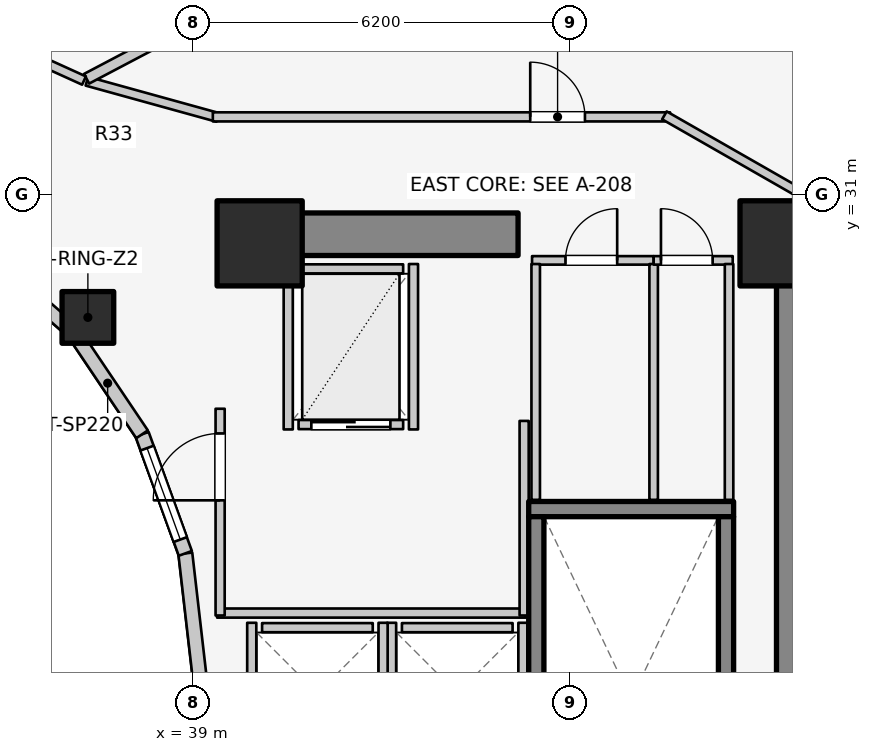
"""IFC4 building model, lengths in metres.
Left out: names, types, materials, properties, quantities, classifications, styles, units other than length and angle.
Written with IfcOpenShell. Run it as: python <this file> out.ifc"""

import sys

from ifc_helpers import new_model, si_unit, direction, frame, frame_2d, origin, origin_2d, place, context, subcontext, project, spatial, rectangle, extrude, element, fill, save


model = new_model("IFC4")
c1 = context("Model", 3, precision=1e-05, world=origin(), true_north=direction((0.0, 1.0)))
c2 = subcontext(c1, "Body", "Model", "MODEL_VIEW")
j1 = project(units=[si_unit("LENGTHUNIT", "METRE"), si_unit("PLANEANGLEUNIT", "RADIAN")], contexts=[c1])
p1 = place(None, origin())
s1 = spatial("IfcSite", under=j1, at=p1, CompositionType="ELEMENT")
p2 = place(p1, origin())
s2 = spatial("IfcBuilding", under=s1, at=p2, CompositionType="ELEMENT")
p3 = place(p2, frame((0.0, 0.0, 98.0)))
s3 = spatial("IfcBuildingStorey", under=s2, at=p3, CompositionType="ELEMENT", Elevation=98.0)
p4 = place(p3, frame((48.95, 17.05, 0.0), z_axis=(0.0, 0.0, 1.0), x_axis=(0.0, 1.0, 0.0)))
e1 = element("IfcWall", 1, at=p4, inside=s3, PredefinedType="SHEAR", context=c2, shape_type="SweptSolid", body=[
    extrude(rectangle(XDim=12.8, YDim=0.7, at=frame_2d((6.4, 0.0))), origin(), (0.0, 0.0, 1.0), 3.1),
])
p5 = place(p3, frame((39.85, 30.35, 0.0), z_axis=(0.0, 0.0, 1.0), x_axis=(1.0, 0.0, 0.0)))
e2 = element("IfcWall", 2, at=p5, inside=s3, PredefinedType="SHEAR", context=c2, shape_type="SweptSolid", body=[
    extrude(rectangle(XDim=4.5, YDim=0.7, at=frame_2d((2.25, 0.0))), origin(), (0.0, 0.0, 1.0), 3.1),
])
p6 = place(p3, frame((44.525, 25.83, 0.0), z_axis=(0.0, 0.0, 1.0), x_axis=(1.0, 0.0, 0.0)))
e3 = element("IfcWall", 3, at=p6, inside=s3, PredefinedType="SOLIDWALL", context=c2, shape_type="SweptSolid", body=[
    extrude(rectangle(XDim=3.37, YDim=0.25, at=frame_2d((1.685, 0.0))), origin(), (0.0, 0.0, 1.0), 3.1),
])
for number, where, z_axis, x_axis in (
    (4, (44.65, 17.895, 0.0), (0.0, 0.0, 1.0), (0.0, 1.0, 0.0)),
    (5, (47.77, 17.895, 0.0), (0.0, 0.0, 1.0), (0.0, 1.0, 0.0)),
):
    element("IfcWall", number, at=place(p3, frame(where, z_axis=z_axis, x_axis=x_axis)), inside=s3, PredefinedType="SOLIDWALL", context=c2, shape_type="SweptSolid", body=[
        extrude(rectangle(XDim=7.81, YDim=0.25, at=frame_2d((3.905, 0.0))), origin(), (0.0, 0.0, 1.0), 3.1),
    ])
for number, where, z_axis, x_axis in (
    (6, (48.7, 30.2, 0.0), (0.0, 0.0, 1.0), (1.0, 0.0, 0.0)),
    (7, (40.1, 30.2, 0.0), (0.0, 0.0, 1.0), (1.0, 0.0, 0.0)),
):
    element("IfcColumn", number, at=place(p3, frame(where, z_axis=z_axis, x_axis=x_axis)), inside=s3, PredefinedType="COLUMN", context=c2, shape_type="SweptSolid", body=[
        extrude(rectangle(XDim=1.4, YDim=1.4, at=origin_2d()), origin(), (0.0, 0.0, 1.0), 3.1),
    ])
p7 = place(p3, frame((37.275, 28.982, 0.0), z_axis=(0.0, 0.0, 1.0), x_axis=(1.0, 0.0, 0.0)))
e8 = element("IfcColumn", 8, at=p7, inside=s3, PredefinedType="COLUMN", context=c2, shape_type="SweptSolid", body=[
    extrude(rectangle(XDim=0.85, YDim=0.85, at=origin_2d()), origin(), (0.0, 0.0, 1.0), 3.1),
])
p8 = place(p3, frame((39.12, 23.0, 0.0), z_axis=(0.0, 0.0, 1.0), x_axis=(-0.114711713601, 0.993398823617, 0.0)))
e9 = element("IfcWall", 9, at=p8, inside=s3, PredefinedType="STANDARD", context=c2, shape_type="SweptSolid", body=[
    extrude(rectangle(XDim=2.115, YDim=0.23, at=frame_2d((1.058, 0.0))), origin(), (0.0, 0.0, 1.0), 2.84),
])
p9 = place(p3, frame((38.877, 25.102, 0.0), z_axis=(0.0, 0.0, 1.0), x_axis=(-0.341423187295, 0.93990968033, 0.0)))
e10 = element("IfcWall", 10, at=p9, inside=s3, PredefinedType="STANDARD", context=c2, shape_type="SweptSolid", body=[
    extrude(rectangle(XDim=2.084, YDim=0.23, at=frame_2d((1.042, 0.0))), origin(), (0.0, 0.0, 1.0), 2.84),
])
p10 = place(p9, frame((0.242, 0.0, 0.85)))
e11 = element("IfcOpeningElement", 11, at=p10, cuts=e10, PredefinedType="OPENING", context=c2, shape_type="SweptSolid", body=[
    extrude(rectangle(XDim=1.6, YDim=1.65, at=frame_2d((0.8, 0.825))), frame((0.0, 0.125, 0.0), z_axis=(0.0, -1.0, 0.0), x_axis=(1.0, 0.0, 0.0)), (0.0, 0.0, 1.0), 0.25),
])
p11 = place(p3, frame((38.166, 27.06, 0.0), z_axis=(0.0, 0.0, 1.0), x_axis=(-0.558197800898, 0.829707909492, 0.0)))
e12 = element("IfcWall", 12, at=p11, inside=s3, PredefinedType="STANDARD", context=c2, shape_type="SweptSolid", body=[
    extrude(rectangle(XDim=2.027, YDim=0.23, at=frame_2d((1.013, 0.0))), origin(), (0.0, 0.0, 1.0), 2.16),
])
p12 = place(p3, frame((37.035, 28.742, 0.0), z_axis=(0.0, 0.0, 1.0), x_axis=(-0.752576694707, 0.658504607869, 0.0)))
e13 = element("IfcWall", 13, at=p12, inside=s3, PredefinedType="STANDARD", context=c2, shape_type="SweptSolid", body=[
    extrude(rectangle(XDim=1.959, YDim=0.23, at=frame_2d((0.98, 0.0))), origin(), (0.0, 0.0, 1.0), 2.16),
])
p13 = place(p3, frame((42.44, 23.88, 0.0), z_axis=(0.0, 0.0, 1.0), x_axis=(1.0, 0.0, 0.0)))
e14 = element("IfcWall", 14, at=p13, inside=s3, PredefinedType="SOLIDWALL", context=c2, shape_type="SweptSolid", body=[
    extrude(rectangle(XDim=1.82, YDim=0.15, at=frame_2d((0.91, 0.0))), origin(), (0.0, 0.0, 1.0), 2.855),
])
for number, where, z_axis, x_axis in (
    (15, (42.27, 21.64, 0.0), (0.0, 0.0, 1.0), (0.0, 1.0, 0.0)),
    (16, (44.43, 21.64, 0.0), (0.0, 0.0, 1.0), (0.0, 1.0, 0.0)),
):
    element("IfcWall", number, at=place(p3, frame(where, z_axis=z_axis, x_axis=x_axis)), inside=s3, PredefinedType="SOLIDWALL", context=c2, shape_type="SweptSolid", body=[
        extrude(rectangle(XDim=2.32, YDim=0.15, at=frame_2d((1.16, 0.0))), origin(), (0.0, 0.0, 1.0), 2.855),
    ])
p14 = place(p3, frame((40.14, 23.88, 0.0), z_axis=(0.0, 0.0, 1.0), x_axis=(1.0, 0.0, 0.0)))
e17 = element("IfcWall", 17, at=p14, inside=s3, PredefinedType="SOLIDWALL", context=c2, shape_type="SweptSolid", body=[
    extrude(rectangle(XDim=1.82, YDim=0.15, at=frame_2d((0.91, 0.0))), origin(), (0.0, 0.0, 1.0), 2.12),
])
p15 = place(p3, frame((39.97, 21.64, 0.0), z_axis=(0.0, 0.0, 1.0), x_axis=(0.0, 1.0, 0.0)))
e18 = element("IfcWall", 18, at=p15, inside=s3, PredefinedType="SOLIDWALL", context=c2, shape_type="SweptSolid", body=[
    extrude(rectangle(XDim=2.32, YDim=0.15, at=frame_2d((1.16, 0.0))), origin(), (0.0, 0.0, 1.0), 2.12),
])
p16 = place(p3, frame((42.13, 21.64, 0.0), z_axis=(0.0, 0.0, 1.0), x_axis=(0.0, 1.0, 0.0)))
e19 = element("IfcWall", 19, at=p16, inside=s3, PredefinedType="SOLIDWALL", context=c2, shape_type="SweptSolid", body=[
    extrude(rectangle(XDim=2.32, YDim=0.15, at=frame_2d((1.16, 0.0))), origin(), (0.0, 0.0, 1.0), 2.855),
])
p17 = place(p3, frame((40.74, 27.22, 0.0), z_axis=(0.0, 0.0, 1.0), x_axis=(1.0, 0.0, 0.0)))
e20 = element("IfcWall", 20, at=p17, inside=s3, PredefinedType="SOLIDWALL", context=c2, shape_type="SweptSolid", body=[
    extrude(rectangle(XDim=1.72, YDim=0.15, at=frame_2d((0.86, 0.0))), origin(), (0.0, 0.0, 1.0), 2.855),
])
p18 = place(p17, frame((0.21, 0.0, 0.0)))
e21 = element("IfcOpeningElement", 21, at=p18, cuts=e20, PredefinedType="OPENING", context=c2, shape_type="SweptSolid", body=[
    extrude(rectangle(XDim=1.3, YDim=2.1, at=frame_2d((0.65, 1.05))), frame((0.0, 0.085, 0.0), z_axis=(0.0, -1.0, 0.0), x_axis=(1.0, 0.0, 0.0)), (0.0, 0.0, 1.0), 0.17),
])
p19 = place(p3, frame((40.74, 29.78, 0.0), z_axis=(0.0, 0.0, 1.0), x_axis=(1.0, 0.0, 0.0)))
e22 = element("IfcWall", 22, at=p19, inside=s3, PredefinedType="SOLIDWALL", context=c2, shape_type="SweptSolid", body=[
    extrude(rectangle(XDim=1.72, YDim=0.15, at=frame_2d((0.86, 0.0))), origin(), (0.0, 0.0, 1.0), 2.855),
])
for number, where, z_axis, x_axis in (
    (23, (40.57, 27.14, 0.0), (0.0, 0.0, 1.0), (0.0, 1.0, 0.0)),
    (24, (42.63, 27.14, 0.0), (0.0, 0.0, 1.0), (0.0, 1.0, 0.0)),
):
    element("IfcWall", number, at=place(p3, frame(where, z_axis=z_axis, x_axis=x_axis)), inside=s3, PredefinedType="SOLIDWALL", context=c2, shape_type="SweptSolid", body=[
        extrude(rectangle(XDim=2.72, YDim=0.15, at=frame_2d((1.36, 0.0))), origin(), (0.0, 0.0, 1.0), 2.855),
    ])
p20 = place(p3, frame((39.4, 24.12, 0.0), z_axis=(0.0, 0.0, 1.0), x_axis=(1.0, 0.0, 0.0)))
e25 = element("IfcWall", 25, at=p20, inside=s3, PredefinedType="PARTITIONING", context=c2, shape_type="SweptSolid", body=[
    extrude(rectangle(XDim=5.08, YDim=0.15, at=frame_2d((2.54, 0.0))), origin(), (0.0, 0.0, 1.0), 2.12),
])
p21 = place(p3, frame((44.45, 24.08, 0.0), z_axis=(0.0, 0.0, 1.0), x_axis=(0.0, 1.0, 0.0)))
e26 = element("IfcWall", 26, at=p21, inside=s3, PredefinedType="PARTITIONING", context=c2, shape_type="SweptSolid", body=[
    extrude(rectangle(XDim=3.2, YDim=0.15, at=frame_2d((1.6, 0.0))), origin(), (0.0, 0.0, 1.0), 2.855),
])
p22 = place(p3, frame((39.45, 24.08, 0.0), z_axis=(0.0, 0.0, 1.0), x_axis=(0.0, 1.0, 0.0)))
e27 = element("IfcWall", 27, at=p22, inside=s3, PredefinedType="PARTITIONING", context=c2, shape_type="SweptSolid", body=[
    extrude(rectangle(XDim=3.4, YDim=0.15, at=frame_2d((1.7, 0.0))), origin(), (0.0, 0.0, 1.0), 2.855),
])
p23 = place(p22, frame((1.894, 0.0, 0.0)))
e28 = element("IfcOpeningElement", 28, at=p23, cuts=e27, PredefinedType="OPENING", context=c2, shape_type="SweptSolid", body=[
    extrude(rectangle(XDim=1.1, YDim=2.1, at=frame_2d((0.55, 1.05))), frame((0.0, 0.085, 0.0), z_axis=(0.0, -1.0, 0.0), x_axis=(1.0, 0.0, 0.0)), (0.0, 0.0, 1.0), 0.17),
])
p24 = place(p3, frame((44.58, 29.92, 0.0), z_axis=(0.0, 0.0, 1.0), x_axis=(1.0, 0.0, 0.0)))
e29 = element("IfcWall", 29, at=p24, inside=s3, PredefinedType="PLUMBINGWALL", context=c2, shape_type="SweptSolid", body=[
    extrude(rectangle(XDim=2.0, YDim=0.14, at=frame_2d((1.0, 0.0))), origin(), (0.0, 0.0, 1.0), 2.855),
])
p25 = place(p24, frame((0.55, 0.0, 0.0)))
e30 = element("IfcOpeningElement", 30, at=p25, cuts=e29, PredefinedType="OPENING", context=c2, shape_type="SweptSolid", body=[
    extrude(rectangle(XDim=0.85, YDim=2.05, at=frame_2d((0.425, 1.025))), frame((0.0, 0.08, 0.0), z_axis=(0.0, -1.0, 0.0), x_axis=(1.0, 0.0, 0.0)), (0.0, 0.0, 1.0), 0.16),
])
for number, where, z_axis, x_axis in (
    (31, (44.64, 25.98, 0.0), (0.0, 0.0, 1.0), (0.0, 1.0, 0.0)),
    (32, (46.58, 25.98, 0.0), (0.0, 0.0, 1.0), (0.0, 1.0, 0.0)),
):
    element("IfcWall", number, at=place(p3, frame(where, z_axis=z_axis, x_axis=x_axis)), inside=s3, PredefinedType="PLUMBINGWALL", context=c2, shape_type="SweptSolid", body=[
        extrude(rectangle(XDim=3.88, YDim=0.14, at=frame_2d((1.94, 0.0))), origin(), (0.0, 0.0, 1.0), 2.855),
    ])
p26 = place(p3, frame((46.58, 29.92, 0.0), z_axis=(0.0, 0.0, 1.0), x_axis=(1.0, 0.0, 0.0)))
e33 = element("IfcWall", 33, at=p26, inside=s3, PredefinedType="PLUMBINGWALL", context=c2, shape_type="SweptSolid", body=[
    extrude(rectangle(XDim=1.3, YDim=0.14, at=frame_2d((0.65, 0.0))), origin(), (0.0, 0.0, 1.0), 2.855),
])
p27 = place(p26, frame((0.12, 0.0, 0.0)))
e34 = element("IfcOpeningElement", 34, at=p27, cuts=e33, PredefinedType="OPENING", context=c2, shape_type="SweptSolid", body=[
    extrude(rectangle(XDim=0.85, YDim=2.05, at=frame_2d((0.425, 1.025))), frame((0.0, 0.08, 0.0), z_axis=(0.0, -1.0, 0.0), x_axis=(1.0, 0.0, 0.0)), (0.0, 0.0, 1.0), 0.16),
])
p28 = place(p3, frame((47.82, 25.98, 0.0), z_axis=(0.0, 0.0, 1.0), x_axis=(0.0, 1.0, 0.0)))
e35 = element("IfcWall", 35, at=p28, inside=s3, PredefinedType="PLUMBINGWALL", context=c2, shape_type="SweptSolid", body=[
    extrude(rectangle(XDim=3.88, YDim=0.14, at=frame_2d((1.94, 0.0))), origin(), (0.0, 0.0, 1.0), 2.855),
])
p29 = place(p3, frame((37.258, 32.867, 0.0), z_axis=(0.0, 0.0, 1.0), x_axis=(0.963833843713, -0.266503886865, 0.0)))
e36 = element("IfcWall", 36, at=p29, inside=s3, PredefinedType="PARTITIONING", context=c2, shape_type="SweptSolid", body=[
    extrude(rectangle(XDim=2.232, YDim=0.15, at=frame_2d((1.116, 0.0))), origin(), (0.0, 0.0, 1.0), 2.272),
])
p30 = place(p3, frame((39.33, 32.28, 0.0), z_axis=(0.0, 0.0, 1.0), x_axis=(1.0, 0.0, 0.0)))
e37 = element("IfcWall", 37, at=p30, inside=s3, PredefinedType="PARTITIONING", context=c2, shape_type="SweptSolid", body=[
    extrude(rectangle(XDim=7.52, YDim=0.15, at=frame_2d((3.76, 0.0))), origin(), (0.0, 0.0, 1.0), 2.272),
])
p31 = place(p30, frame((5.22, 0.0, 0.0)))
e38 = element("IfcOpeningElement", 38, at=p31, cuts=e37, PredefinedType="OPENING", context=c2, shape_type="SweptSolid", body=[
    extrude(rectangle(XDim=0.9, YDim=2.1, at=frame_2d((0.45, 1.05))), frame((0.0, 0.085, 0.0), z_axis=(0.0, -1.0, 0.0), x_axis=(1.0, 0.0, 0.0)), (0.0, 0.0, 1.0), 0.17),
])
p32 = place(p3, frame((46.757, 32.305, 0.0), z_axis=(0.0, 0.0, 1.0), x_axis=(0.867991349648, -0.496579315857, 0.0)))
e39 = element("IfcWall", 39, at=p32, inside=s3, PredefinedType="PARTITIONING", context=c2, shape_type="SweptSolid", body=[
    extrude(rectangle(XDim=2.567, YDim=0.15, at=frame_2d((1.283, 0.0))), origin(), (0.0, 0.0, 1.0), 2.142),
])
p33 = place(p3, frame((37.254, 32.907, 0.0), z_axis=(0.0, 0.0, 1.0), x_axis=(0.884730147854, 0.466103599512, 0.0)))
e40 = element("IfcWall", 40, at=p33, inside=s3, PredefinedType="PARTITIONING", context=c2, shape_type="SweptSolid", body=[
    extrude(rectangle(XDim=8.31, YDim=0.18, at=frame_2d((4.155, 0.0))), origin(), (0.0, 0.0, 1.0), 2.272),
])
p34 = place(p3, frame((37.211, 32.877, 0.0), z_axis=(0.0, 0.0, 1.0), x_axis=(-0.910568469686, 0.41335827319, 0.0)))
e41 = element("IfcWall", 41, at=p34, inside=s3, PredefinedType="PARTITIONING", context=c2, shape_type="SweptSolid", body=[
    extrude(rectangle(XDim=2.772, YDim=0.15, at=frame_2d((1.386, 0.0))), origin(), (0.0, 0.0, 1.0), 2.272),
])
p35 = place(p34, frame((0.911, 0.0, 0.0)))
e42 = element("IfcOpeningElement", 42, at=p35, cuts=e41, PredefinedType="OPENING", context=c2, shape_type="SweptSolid", body=[
    extrude(rectangle(XDim=0.95, YDim=2.1, at=frame_2d((0.475, 1.05))), frame((0.0, 0.085, 0.0), z_axis=(0.0, -1.0, 0.0), x_axis=(1.0, 0.0, 0.0)), (0.0, 0.0, 1.0), 0.17),
])
p36 = place(p10, origin())
e43 = element("IfcWindow", 43, at=p36, inside=s3, PartitioningType="SINGLE_PANEL", PredefinedType="WINDOW", context=c2, shape_type="SweptSolid", body=[
    extrude(rectangle(XDim=1.6, YDim=1.65, at=frame_2d((0.8, 0.825))), frame((0.0, 0.03, 0.0), z_axis=(0.0, -1.0, 0.0), x_axis=(1.0, 0.0, 0.0)), (0.0, 0.0, 1.0), 0.06),
])
fill(e11, e43)
p37 = place(p18, origin())
e44 = element("IfcDoor", 44, at=p37, inside=s3, OperationType="DOUBLE_DOOR_SLIDING", PredefinedType="DOOR", context=c2, shape_type="SweptSolid", body=[
    extrude(rectangle(XDim=1.3, YDim=2.1, at=frame_2d((0.65, 1.05))), frame((0.0, 0.025, 0.0), z_axis=(0.0, -1.0, 0.0), x_axis=(1.0, 0.0, 0.0)), (0.0, 0.0, 1.0), 0.05),
])
fill(e21, e44)
p38 = place(p23, origin())
e45 = element("IfcDoor", 45, at=p38, inside=s3, OperationType="SINGLE_SWING_LEFT", PredefinedType="DOOR", context=c2, shape_type="SweptSolid", body=[
    extrude(rectangle(XDim=1.1, YDim=2.1, at=frame_2d((0.55, 1.05))), frame((0.0, 0.025, 0.0), z_axis=(0.0, -1.0, 0.0), x_axis=(1.0, 0.0, 0.0)), (0.0, 0.0, 1.0), 0.05),
])
fill(e28, e45)
p39 = place(p25, origin())
e46 = element("IfcDoor", 46, at=p39, inside=s3, OperationType="SINGLE_SWING_RIGHT", PredefinedType="DOOR", context=c2, shape_type="SweptSolid", body=[
    extrude(rectangle(XDim=0.85, YDim=2.05, at=frame_2d((0.425, 1.025))), frame((0.0, 0.025, 0.0), z_axis=(0.0, -1.0, 0.0), x_axis=(1.0, 0.0, 0.0)), (0.0, 0.0, 1.0), 0.05),
])
fill(e30, e46)
p40 = place(p27, origin())
e47 = element("IfcDoor", 47, at=p40, inside=s3, OperationType="SINGLE_SWING_LEFT", PredefinedType="DOOR", context=c2, shape_type="SweptSolid", body=[
    extrude(rectangle(XDim=0.85, YDim=2.05, at=frame_2d((0.425, 1.025))), frame((0.0, 0.025, 0.0), z_axis=(0.0, -1.0, 0.0), x_axis=(1.0, 0.0, 0.0)), (0.0, 0.0, 1.0), 0.05),
])
fill(e34, e47)
p41 = place(p31, origin())
e48 = element("IfcDoor", 48, at=p41, inside=s3, OperationType="SINGLE_SWING_LEFT", PredefinedType="DOOR", context=c2, shape_type="SweptSolid", body=[
    extrude(rectangle(XDim=0.9, YDim=2.1, at=frame_2d((0.45, 1.05))), frame((0.0, 0.025, 0.0), z_axis=(0.0, -1.0, 0.0), x_axis=(1.0, 0.0, 0.0)), (0.0, 0.0, 1.0), 0.05),
])
fill(e38, e48)
save(model, sys.argv[1])
